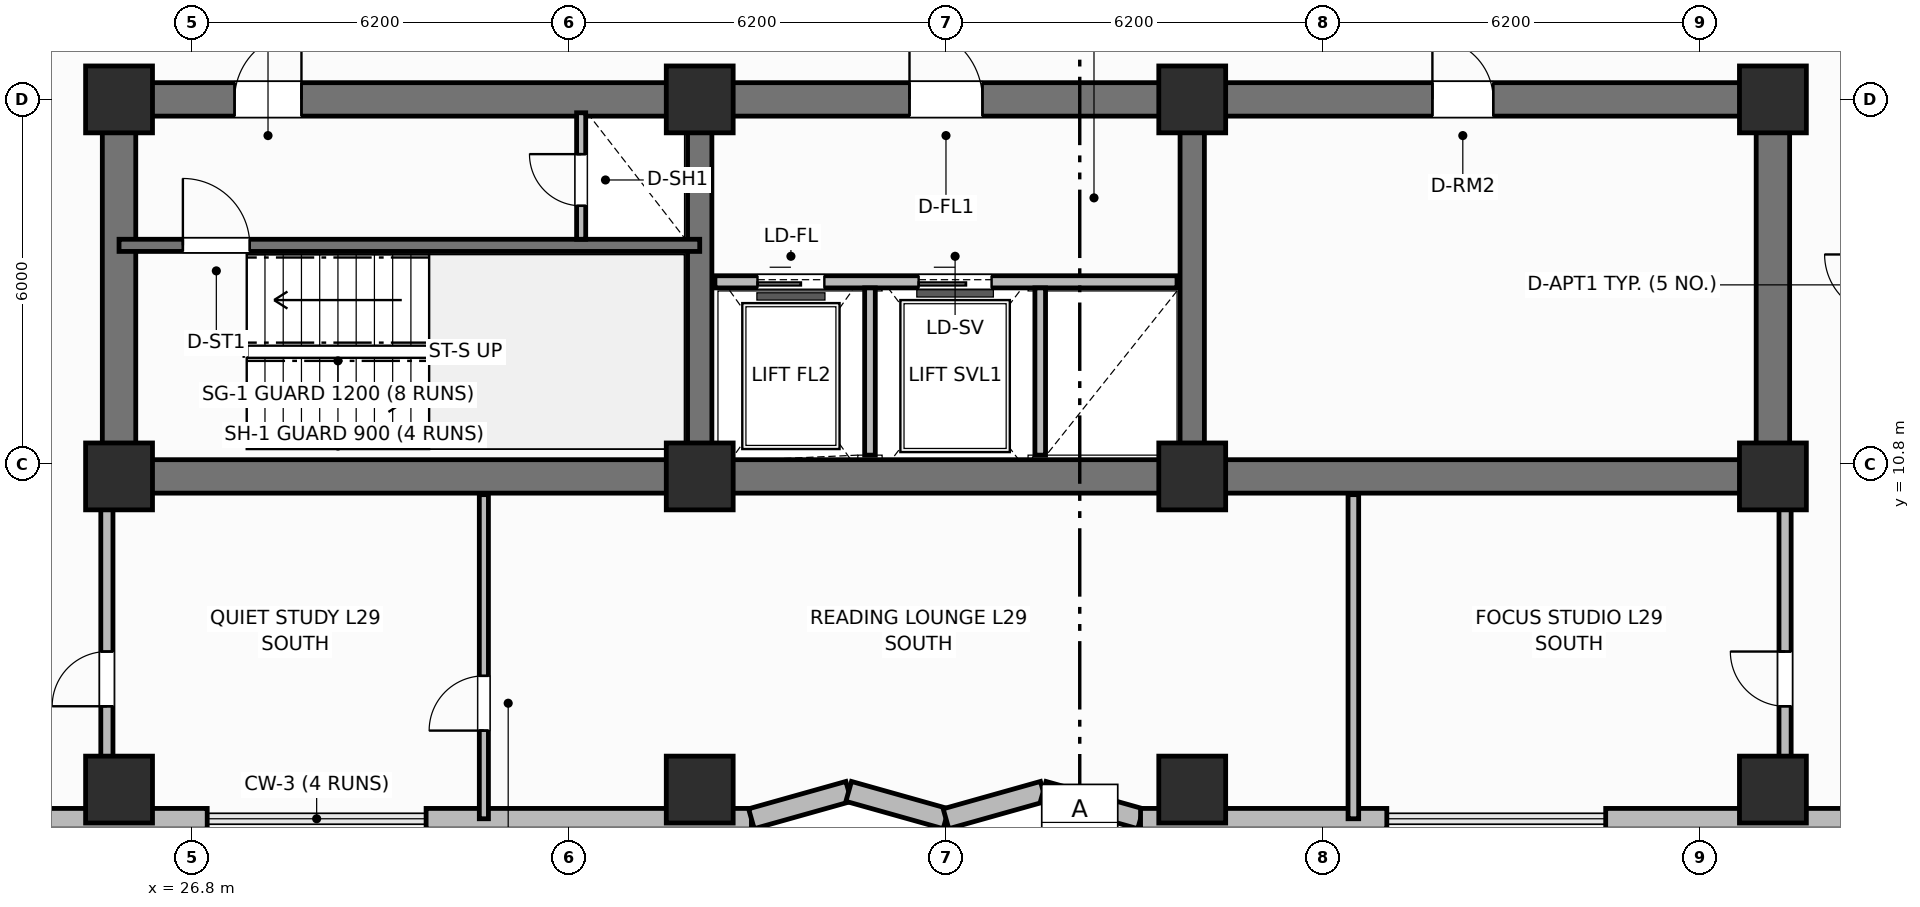
"""IFC4 building model, lengths in metres.
Left out: names, types, materials, properties, quantities, classifications, styles, units other than length and angle.
Written with IfcOpenShell. Run it as: python <this file> out.ifc"""

import sys

from ifc_helpers import new_model, si_unit, direction, frame, frame_2d, origin, origin_2d, place, context, subcontext, project, spatial, rectangle, extrude, element, fill, save


model = new_model("IFC4")
c1 = context("Model", 3, precision=1e-05, world=origin(), true_north=direction((0.0, 1.0)))
c2 = subcontext(c1, "Body", "Model", "MODEL_VIEW")
j1 = project(units=[si_unit("LENGTHUNIT", "METRE"), si_unit("PLANEANGLEUNIT", "RADIAN")], contexts=[c1])
p1 = place(None, origin())
s1 = spatial("IfcSite", under=j1, at=p1, CompositionType="ELEMENT")
p2 = place(p1, origin())
s2 = spatial("IfcBuilding", under=s1, at=p2, CompositionType="ELEMENT")
p3 = place(p2, frame((0.0, 0.0, 117.9)))
s3 = spatial("IfcBuildingStorey", under=s2, at=p3, CompositionType="ELEMENT", Elevation=117.9)
p4 = place(p3, frame((52.8, 10.6, 0.0), z_axis=(0.0, 0.0, 1.0), x_axis=(-1.0, 0.0, 0.0)))
e1 = element("IfcWall", 1, at=p4, inside=s3, PredefinedType="SHEAR", context=c2, shape_type="SweptSolid", body=[
    extrude(rectangle(XDim=27.2, YDim=0.55, at=frame_2d((13.6, 0.0))), origin(), (0.0, 0.0, 1.0), 3.7),
])
for number, where, z_axis, x_axis in (
    (2, (25.6, 10.875, 0.0), (0.0, 0.0, 1.0), (0.0, 1.0, 0.0)),
    (3, (52.8, 10.875, 0.0), (0.0, 0.0, 1.0), (0.0, 1.0, 0.0)),
):
    element("IfcWall", number, at=place(p3, frame(where, z_axis=z_axis, x_axis=x_axis)), inside=s3, PredefinedType="SHEAR", context=c2, shape_type="SweptSolid", body=[
        extrude(rectangle(XDim=5.65, YDim=0.55, at=frame_2d((2.825, 0.0))), origin(), (0.0, 0.0, 1.0), 3.7),
    ])
p5 = place(p3, frame((25.6, 16.8, 0.0), z_axis=(0.0, 0.0, 1.0), x_axis=(1.0, 0.0, 0.0)))
e4 = element("IfcWall", 4, at=p5, inside=s3, PredefinedType="SHEAR", context=c2, shape_type="SweptSolid", body=[
    extrude(rectangle(XDim=27.2, YDim=0.55, at=frame_2d((13.6, 0.0))), origin(), (0.0, 0.0, 1.0), 3.7),
])
p6 = place(p5, frame((1.9, 0.0, 0.0)))
e5 = element("IfcOpeningElement", 5, at=p6, cuts=e4, PredefinedType="OPENING", context=c2, shape_type="SweptSolid", body=[
    extrude(rectangle(XDim=1.1, YDim=2.15, at=frame_2d((0.55, 1.075))), frame((0.0, 0.285, 0.0), z_axis=(0.0, -1.0, 0.0), x_axis=(1.0, 0.0, 0.0)), (0.0, 0.0, 1.0), 0.57),
])
p7 = place(p5, frame((13.0, 0.0, 0.0)))
e6 = element("IfcOpeningElement", 6, at=p7, cuts=e4, PredefinedType="OPENING", context=c2, shape_type="SweptSolid", body=[
    extrude(rectangle(XDim=1.2, YDim=2.15, at=frame_2d((0.6, 1.075))), frame((0.0, 0.285, 0.0), z_axis=(0.0, -1.0, 0.0), x_axis=(1.0, 0.0, 0.0)), (0.0, 0.0, 1.0), 0.57),
])
p8 = place(p5, frame((21.6, 0.0, 0.0)))
e7 = element("IfcOpeningElement", 7, at=p8, cuts=e4, PredefinedType="OPENING", context=c2, shape_type="SweptSolid", body=[
    extrude(rectangle(XDim=1.0, YDim=2.15, at=frame_2d((0.5, 1.075))), frame((0.0, 0.285, 0.0), z_axis=(0.0, -1.0, 0.0), x_axis=(1.0, 0.0, 0.0)), (0.0, 0.0, 1.0), 0.57),
])
for number, where, z_axis, x_axis in (
    (8, (35.15, 10.875, 0.0), (0.0, 0.0, 1.0), (0.0, 1.0, 0.0)),
    (9, (43.25, 10.875, 0.0), (0.0, 0.0, 1.0), (0.0, 1.0, 0.0)),
):
    element("IfcWall", number, at=place(p3, frame(where, z_axis=z_axis, x_axis=x_axis)), inside=s3, PredefinedType="SHEAR", context=c2, shape_type="SweptSolid", body=[
        extrude(rectangle(XDim=5.65, YDim=0.4, at=frame_2d((2.825, 0.0))), origin(), (0.0, 0.0, 1.0), 3.7),
    ])
for number, where, z_axis, x_axis in (
    (10, (25.6, 10.6, 0.0), (0.0, 0.0, 1.0), (1.0, 0.0, 0.0)),
    (11, (25.6, 16.8, 0.0), (0.0, 0.0, 1.0), (1.0, 0.0, 0.0)),
    (12, (35.15, 10.6, 0.0), (0.0, 0.0, 1.0), (1.0, 0.0, 0.0)),
    (13, (35.15, 16.8, 0.0), (0.0, 0.0, 1.0), (1.0, 0.0, 0.0)),
    (14, (43.25, 10.6, 0.0), (0.0, 0.0, 1.0), (1.0, 0.0, 0.0)),
    (15, (43.25, 16.8, 0.0), (0.0, 0.0, 1.0), (1.0, 0.0, 0.0)),
    (16, (52.8, 10.6, 0.0), (0.0, 0.0, 1.0), (1.0, 0.0, 0.0)),
    (17, (52.8, 16.8, 0.0), (0.0, 0.0, 1.0), (1.0, 0.0, 0.0)),
    (18, (25.6, 5.45, 0.0), (0.0, 0.0, 1.0), (1.0, 0.0, 0.0)),
    (19, (35.15, 5.45, 0.0), (0.0, 0.0, 1.0), (1.0, 0.0, 0.0)),
    (20, (43.25, 5.45, 0.0), (0.0, 0.0, 1.0), (1.0, 0.0, 0.0)),
    (21, (52.8, 5.45, 0.0), (0.0, 0.0, 1.0), (1.0, 0.0, 0.0)),
):
    element("IfcColumn", number, at=place(p3, frame(where, z_axis=z_axis, x_axis=x_axis)), inside=s3, PredefinedType="COLUMN", context=c2, shape_type="SweptSolid", body=[
        extrude(rectangle(XDim=1.1, YDim=1.1, at=origin_2d()), origin(), (0.0, 0.0, 1.0), 3.7),
    ])
p9 = place(p3, frame((18.6, 4.97, 0.0), z_axis=(0.0, 0.0, 1.0), x_axis=(1.0, 0.0, 0.0)))
e22 = element("IfcWall", 22, at=p9, inside=s3, PredefinedType="SOLIDWALL", context=c2, shape_type="SweptSolid", body=[
    extrude(rectangle(XDim=8.45, YDim=0.34, at=frame_2d((4.225, 0.0))), origin(), (0.0, 0.0, 1.0), 2.7),
])
p10 = place(p9, frame((2.125, 0.0, 0.68)))
e23 = element("IfcOpeningElement", 23, at=p10, cuts=e22, PredefinedType="OPENING", context=c2, shape_type="SweptSolid", body=[
    extrude(rectangle(XDim=2.1, YDim=1.9, at=frame_2d((1.05, 0.95))), frame((0.0, 0.18, 0.0), z_axis=(0.0, -1.0, 0.0), x_axis=(1.0, 0.0, 0.0)), (0.0, 0.0, 1.0), 0.36),
])
p11 = place(p3, frame((30.65, 4.97, 0.0), z_axis=(0.0, 0.0, 1.0), x_axis=(1.0, 0.0, 0.0)))
e24 = element("IfcWall", 24, at=p11, inside=s3, PredefinedType="SOLIDWALL", context=c2, shape_type="SweptSolid", body=[
    extrude(rectangle(XDim=5.35, YDim=0.34, at=frame_2d((2.675, 0.0))), origin(), (0.0, 0.0, 1.0), 2.7),
])
p12 = place(p3, frame((36.0, 4.97, 0.0), z_axis=(0.0, 0.0, 1.0), x_axis=(0.962662902433, 0.270703040766, 0.0)))
e25 = element("IfcWall", 25, at=p12, inside=s3, PredefinedType="SOLIDWALL", context=c2, shape_type="SweptSolid", body=[
    extrude(rectangle(XDim=1.662, YDim=0.34, at=frame_2d((0.831, 0.0))), origin(), (0.0, 0.0, 1.0), 2.7),
])
p13 = place(p3, frame((37.6, 5.42, 0.0), z_axis=(0.0, 0.0, 1.0), x_axis=(0.962652136636, -0.270741322725, 0.0)))
e26 = element("IfcWall", 26, at=p13, inside=s3, PredefinedType="SOLIDWALL", context=c2, shape_type="SweptSolid", body=[
    extrude(rectangle(XDim=1.662, YDim=0.34, at=frame_2d((0.831, 0.0))), origin(), (0.0, 0.0, 1.0), 2.7),
])
p14 = place(p3, frame((39.2, 4.97, 0.0), z_axis=(0.0, 0.0, 1.0), x_axis=(0.962662902433, 0.270703040766, 0.0)))
e27 = element("IfcWall", 27, at=p14, inside=s3, PredefinedType="SOLIDWALL", context=c2, shape_type="SweptSolid", body=[
    extrude(rectangle(XDim=1.662, YDim=0.34, at=frame_2d((0.831, 0.0))), origin(), (0.0, 0.0, 1.0), 2.7),
])
p15 = place(p3, frame((40.8, 5.42, 0.0), z_axis=(0.0, 0.0, 1.0), x_axis=(0.962652136636, -0.270741322725, 0.0)))
e28 = element("IfcWall", 28, at=p15, inside=s3, PredefinedType="SOLIDWALL", context=c2, shape_type="SweptSolid", body=[
    extrude(rectangle(XDim=1.662, YDim=0.34, at=frame_2d((0.831, 0.0))), origin(), (0.0, 0.0, 1.0), 2.7),
])
p16 = place(p3, frame((42.4, 4.97, 0.0), z_axis=(0.0, 0.0, 1.0), x_axis=(1.0, 0.0, 0.0)))
e29 = element("IfcWall", 29, at=p16, inside=s3, PredefinedType="SOLIDWALL", context=c2, shape_type="SweptSolid", body=[
    extrude(rectangle(XDim=4.05, YDim=0.34, at=frame_2d((2.025, 0.0))), origin(), (0.0, 0.0, 1.0), 2.7),
])
p17 = place(p3, frame((50.05, 4.97, 0.0), z_axis=(0.0, 0.0, 1.0), x_axis=(1.0, 0.0, 0.0)))
e30 = element("IfcWall", 30, at=p17, inside=s3, PredefinedType="SOLIDWALL", context=c2, shape_type="SweptSolid", body=[
    extrude(rectangle(XDim=9.75, YDim=0.34, at=frame_2d((4.875, 0.0))), origin(), (0.0, 0.0, 1.0), 2.7),
])
p18 = place(p17, frame((5.938, 0.0, 0.68)))
e31 = element("IfcOpeningElement", 31, at=p18, cuts=e30, PredefinedType="OPENING", context=c2, shape_type="SweptSolid", body=[
    extrude(rectangle(XDim=2.1, YDim=1.9, at=frame_2d((1.05, 0.95))), frame((0.0, 0.18, 0.0), z_axis=(0.0, -1.0, 0.0), x_axis=(1.0, 0.0, 0.0)), (0.0, 0.0, 1.0), 0.36),
])
p19 = place(p3, frame((25.6, 14.4, 0.0), z_axis=(0.0, 0.0, 1.0), x_axis=(1.0, 0.0, 0.0)))
e32 = element("IfcWall", 32, at=p19, inside=s3, PredefinedType="SHEAR", context=c2, shape_type="SweptSolid", body=[
    extrude(rectangle(XDim=9.55, YDim=0.2, at=frame_2d((4.775, 0.0))), origin(), (0.0, 0.0, 1.0), 3.7),
])
p20 = place(p19, frame((1.05, 0.0, 0.0)))
e33 = element("IfcOpeningElement", 33, at=p20, cuts=e32, PredefinedType="OPENING", context=c2, shape_type="SweptSolid", body=[
    extrude(rectangle(XDim=1.1, YDim=2.15, at=frame_2d((0.55, 1.075))), frame((0.0, 0.11, 0.0), z_axis=(0.0, -1.0, 0.0), x_axis=(1.0, 0.0, 0.0)), (0.0, 0.0, 1.0), 0.22),
])
p21 = place(p3, frame((33.2, 14.5, 0.0), z_axis=(0.0, 0.0, 1.0), x_axis=(0.0, 1.0, 0.0)))
e34 = element("IfcWall", 34, at=p21, inside=s3, PredefinedType="PARTITIONING", context=c2, shape_type="SweptSolid", body=[
    extrude(rectangle(XDim=2.08, YDim=0.15, at=frame_2d((1.04, 0.0))), origin(), (0.0, 0.0, 1.0), 2.53),
])
p22 = place(p21, frame((0.55, 0.0, 0.0)))
e35 = element("IfcOpeningElement", 35, at=p22, cuts=e34, PredefinedType="OPENING", context=c2, shape_type="SweptSolid", body=[
    extrude(rectangle(XDim=0.85, YDim=2.05, at=frame_2d((0.425, 1.025))), frame((0.0, 0.085, 0.0), z_axis=(0.0, -1.0, 0.0), x_axis=(1.0, 0.0, 0.0)), (0.0, 0.0, 1.0), 0.17),
])
p23 = place(p3, frame((35.4, 13.8, 0.0), z_axis=(0.0, 0.0, 1.0), x_axis=(1.0, 0.0, 0.0)))
e36 = element("IfcWall", 36, at=p23, inside=s3, PredefinedType="PARTITIONING", context=c2, shape_type="SweptSolid", body=[
    extrude(rectangle(XDim=7.6, YDim=0.2, at=frame_2d((3.8, 0.0))), origin(), (0.0, 0.0, 1.0), 2.3),
])
p24 = place(p23, frame((0.7, 0.0, 0.0)))
e37 = element("IfcOpeningElement", 37, at=p24, cuts=e36, PredefinedType="OPENING", context=c2, shape_type="SweptSolid", body=[
    extrude(rectangle(XDim=1.1, YDim=2.15, at=frame_2d((0.55, 1.075))), frame((0.0, 0.11, 0.0), z_axis=(0.0, -1.0, 0.0), x_axis=(1.0, 0.0, 0.0)), (0.0, 0.0, 1.0), 0.22),
])
p25 = place(p23, frame((3.35, 0.0, 0.0)))
e38 = element("IfcOpeningElement", 38, at=p25, cuts=e36, PredefinedType="OPENING", context=c2, shape_type="SweptSolid", body=[
    extrude(rectangle(XDim=1.2, YDim=2.15, at=frame_2d((0.6, 1.075))), frame((0.0, 0.11, 0.0), z_axis=(0.0, -1.0, 0.0), x_axis=(1.0, 0.0, 0.0)), (0.0, 0.0, 1.0), 0.22),
])
for number, where, z_axis, x_axis in (
    (39, (37.95, 10.95, 0.0), (0.0, 0.0, 1.0), (0.0, 1.0, 0.0)),
    (40, (40.75, 10.95, 0.0), (0.0, 0.0, 1.0), (0.0, 1.0, 0.0)),
):
    element("IfcWall", number, at=place(p3, frame(where, z_axis=z_axis, x_axis=x_axis)), inside=s3, PredefinedType="PARTITIONING", context=c2, shape_type="SweptSolid", body=[
        extrude(rectangle(XDim=2.75, YDim=0.175, at=frame_2d((1.375, 0.0))), origin(), (0.0, 0.0, 1.0), 2.53),
    ])
p26 = place(p3, frame((31.6, 4.97, 0.0), z_axis=(0.0, 0.0, 1.0), x_axis=(0.0, 1.0, 0.0)))
e41 = element("IfcWall", 41, at=p26, inside=s3, PredefinedType="PARTITIONING", context=c2, shape_type="SweptSolid", body=[
    extrude(rectangle(XDim=5.33, YDim=0.15, at=frame_2d((2.665, 0.0))), origin(), (0.0, 0.0, 1.0), 2.53),
])
p27 = place(p26, frame((1.45, 0.0, 0.0)))
e42 = element("IfcOpeningElement", 42, at=p27, cuts=e41, PredefinedType="OPENING", context=c2, shape_type="SweptSolid", body=[
    extrude(rectangle(XDim=0.9, YDim=2.1, at=frame_2d((0.45, 1.05))), frame((0.0, 0.085, 0.0), z_axis=(0.0, -1.0, 0.0), x_axis=(1.0, 0.0, 0.0)), (0.0, 0.0, 1.0), 0.17),
])
p28 = place(p3, frame((45.9, 4.97, 0.0), z_axis=(0.0, 0.0, 1.0), x_axis=(0.0, 1.0, 0.0)))
e43 = element("IfcWall", 43, at=p28, inside=s3, PredefinedType="PARTITIONING", context=c2, shape_type="SweptSolid", body=[
    extrude(rectangle(XDim=5.33, YDim=0.175, at=frame_2d((2.665, 0.0))), origin(), (0.0, 0.0, 1.0), 2.53),
])
p29 = place(p3, frame((25.4, 5.77, 0.0), z_axis=(0.0, 0.0, 1.0), x_axis=(0.0, 1.0, 0.0)))
e44 = element("IfcWall", 44, at=p29, inside=s3, PredefinedType="PARTITIONING", context=c2, shape_type="SweptSolid", body=[
    extrude(rectangle(XDim=4.53, YDim=0.2, at=frame_2d((2.265, 0.0))), origin(), (0.0, 0.0, 1.0), 2.53),
])
p30 = place(p29, frame((1.05, 0.0, 0.0)))
e45 = element("IfcOpeningElement", 45, at=p30, cuts=e44, PredefinedType="OPENING", context=c2, shape_type="SweptSolid", body=[
    extrude(rectangle(XDim=0.9, YDim=2.1, at=frame_2d((0.45, 1.05))), frame((0.0, 0.11, 0.0), z_axis=(0.0, -1.0, 0.0), x_axis=(1.0, 0.0, 0.0)), (0.0, 0.0, 1.0), 0.22),
])
p31 = place(p3, frame((53.0, 5.77, 0.0), z_axis=(0.0, 0.0, 1.0), x_axis=(0.0, 1.0, 0.0)))
e46 = element("IfcWall", 46, at=p31, inside=s3, PredefinedType="PARTITIONING", context=c2, shape_type="SweptSolid", body=[
    extrude(rectangle(XDim=4.53, YDim=0.2, at=frame_2d((2.265, 0.0))), origin(), (0.0, 0.0, 1.0), 2.53),
])
p32 = place(p31, frame((1.05, 0.0, 0.0)))
e47 = element("IfcOpeningElement", 47, at=p32, cuts=e46, PredefinedType="OPENING", context=c2, shape_type="SweptSolid", body=[
    extrude(rectangle(XDim=0.9, YDim=2.1, at=frame_2d((0.45, 1.05))), frame((0.0, 0.11, 0.0), z_axis=(0.0, -1.0, 0.0), x_axis=(1.0, 0.0, 0.0)), (0.0, 0.0, 1.0), 0.22),
])
p33 = place(p20, origin())
e48 = element("IfcDoor", 48, at=p33, inside=s3, OperationType="SINGLE_SWING_LEFT", PredefinedType="DOOR", context=c2, shape_type="SweptSolid", body=[
    extrude(rectangle(XDim=1.1, YDim=2.15, at=frame_2d((0.55, 1.075))), frame((0.0, 0.025, 0.0), z_axis=(0.0, -1.0, 0.0), x_axis=(1.0, 0.0, 0.0)), (0.0, 0.0, 1.0), 0.05),
])
fill(e33, e48)
p34 = place(p22, origin())
e49 = element("IfcDoor", 49, at=p34, inside=s3, OperationType="SINGLE_SWING_RIGHT", PredefinedType="TRAPDOOR", context=c2, shape_type="SweptSolid", body=[
    extrude(rectangle(XDim=0.85, YDim=2.05, at=frame_2d((0.425, 1.025))), frame((0.0, 0.025, 0.0), z_axis=(0.0, -1.0, 0.0), x_axis=(1.0, 0.0, 0.0)), (0.0, 0.0, 1.0), 0.05),
])
fill(e35, e49)
p35 = place(p24, origin())
e50 = element("IfcDoor", 50, at=p35, inside=s3, OperationType="SLIDING_TO_LEFT", PredefinedType="DOOR", context=c2, shape_type="SweptSolid", body=[
    extrude(rectangle(XDim=1.1, YDim=2.15, at=frame_2d((0.55, 1.075))), frame((0.0, 0.025, 0.0), z_axis=(0.0, -1.0, 0.0), x_axis=(1.0, 0.0, 0.0)), (0.0, 0.0, 1.0), 0.05),
])
fill(e37, e50)
p36 = place(p25, origin())
e51 = element("IfcDoor", 51, at=p36, inside=s3, OperationType="SLIDING_TO_LEFT", PredefinedType="DOOR", context=c2, shape_type="SweptSolid", body=[
    extrude(rectangle(XDim=1.2, YDim=2.15, at=frame_2d((0.6, 1.075))), frame((0.0, 0.025, 0.0), z_axis=(0.0, -1.0, 0.0), x_axis=(1.0, 0.0, 0.0)), (0.0, 0.0, 1.0), 0.05),
])
fill(e38, e51)
p37 = place(p27, origin())
e52 = element("IfcDoor", 52, at=p37, inside=s3, OperationType="SINGLE_SWING_LEFT", PredefinedType="DOOR", context=c2, shape_type="SweptSolid", body=[
    extrude(rectangle(XDim=0.9, YDim=2.1, at=frame_2d((0.45, 1.05))), frame((0.0, 0.025, 0.0), z_axis=(0.0, -1.0, 0.0), x_axis=(1.0, 0.0, 0.0)), (0.0, 0.0, 1.0), 0.05),
])
fill(e42, e52)
p38 = place(p30, origin())
e53 = element("IfcDoor", 53, at=p38, inside=s3, OperationType="SINGLE_SWING_LEFT", PredefinedType="DOOR", context=c2, shape_type="SweptSolid", body=[
    extrude(rectangle(XDim=0.9, YDim=2.1, at=frame_2d((0.45, 1.05))), frame((0.0, 0.025, 0.0), z_axis=(0.0, -1.0, 0.0), x_axis=(1.0, 0.0, 0.0)), (0.0, 0.0, 1.0), 0.05),
])
fill(e45, e53)
p39 = place(p32, origin())
e54 = element("IfcDoor", 54, at=p39, inside=s3, OperationType="SINGLE_SWING_RIGHT", PredefinedType="DOOR", context=c2, shape_type="SweptSolid", body=[
    extrude(rectangle(XDim=0.9, YDim=2.1, at=frame_2d((0.45, 1.05))), frame((0.0, 0.025, 0.0), z_axis=(0.0, -1.0, 0.0), x_axis=(1.0, 0.0, 0.0)), (0.0, 0.0, 1.0), 0.05),
])
fill(e47, e54)
p40 = place(p6, origin())
e55 = element("IfcDoor", 55, at=p40, inside=s3, OperationType="SINGLE_SWING_RIGHT", PredefinedType="DOOR", context=c2, shape_type="SweptSolid", body=[
    extrude(rectangle(XDim=1.1, YDim=2.15, at=frame_2d((0.55, 1.075))), frame((0.0, 0.025, 0.0), z_axis=(0.0, -1.0, 0.0), x_axis=(1.0, 0.0, 0.0)), (0.0, 0.0, 1.0), 0.05),
])
fill(e5, e55)
p41 = place(p7, origin())
e56 = element("IfcDoor", 56, at=p41, inside=s3, OperationType="SINGLE_SWING_LEFT", PredefinedType="DOOR", context=c2, shape_type="SweptSolid", body=[
    extrude(rectangle(XDim=1.2, YDim=2.15, at=frame_2d((0.6, 1.075))), frame((0.0, 0.025, 0.0), z_axis=(0.0, -1.0, 0.0), x_axis=(1.0, 0.0, 0.0)), (0.0, 0.0, 1.0), 0.05),
])
fill(e6, e56)
p42 = place(p8, origin())
e57 = element("IfcDoor", 57, at=p42, inside=s3, OperationType="SINGLE_SWING_LEFT", PredefinedType="DOOR", context=c2, shape_type="SweptSolid", body=[
    extrude(rectangle(XDim=1.0, YDim=2.15, at=frame_2d((0.5, 1.075))), frame((0.0, 0.025, 0.0), z_axis=(0.0, -1.0, 0.0), x_axis=(1.0, 0.0, 0.0)), (0.0, 0.0, 1.0), 0.05),
])
fill(e7, e57)
save(model, sys.argv[1])
